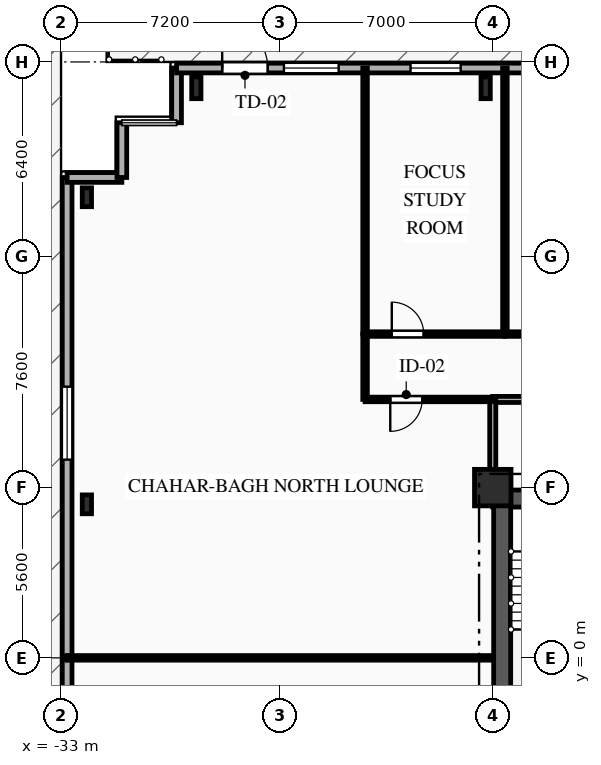
"""IFC4 building model, lengths in metres.
Left out: names, types, materials, properties, quantities, classifications, styles, units other than length and angle.
Written with IfcOpenShell. Run it as: python <this file> out.ifc"""

import sys

from ifc_helpers import new_model, si_unit, direction, frame, frame_2d, origin, origin_2d, place, context, subcontext, project, spatial, rectangle, i_section, extrude, element, fill, save


model = new_model("IFC4")
c1 = context("Model", 3, precision=1e-05, world=origin(), true_north=direction((0.0, 1.0)))
c2 = subcontext(c1, "Body", "Model", "MODEL_VIEW")
j1 = project(units=[si_unit("LENGTHUNIT", "METRE"), si_unit("PLANEANGLEUNIT", "RADIAN")], contexts=[c1])
p1 = place(None, origin())
s1 = spatial("IfcSite", under=j1, at=p1, CompositionType="ELEMENT")
p2 = place(p1, origin())
s2 = spatial("IfcBuilding", under=s1, at=p2, CompositionType="ELEMENT")
p3 = place(p2, frame((0.0, 0.0, 27.0)))
s3 = spatial("IfcBuildingStorey", under=s2, at=p3, CompositionType="ELEMENT", Elevation=27.0)
p4 = place(p3, frame((-18.8, 5.6, 0.0), z_axis=(0.0, 0.0, 1.0), x_axis=(1.0, 0.0, 0.0)))
e1 = element("IfcColumn", 1, at=p4, inside=s3, PredefinedType="COLUMN", context=c2, shape_type="SweptSolid", body=[
    extrude(rectangle(XDim=1.2, YDim=1.2, at=origin_2d()), origin(), (0.0, 0.0, 1.0), 3.35),
])
for number, where, z_axis, x_axis in (
    (2, (-19.033, 18.75, 0.0), (0.0, 0.0, 1.0), (1.0, 0.0, 0.0)),
    (3, (-28.55, 18.75, 0.0), (0.0, 0.0, 1.0), (1.0, 0.0, 0.0)),
):
    element("IfcColumn", number, at=place(p3, frame(where, z_axis=z_axis, x_axis=x_axis)), inside=s3, PredefinedType="COLUMN", context=c2, shape_type="SweptSolid", body=[
        extrude(i_section(OverallWidth=0.304, OverallDepth=0.716, WebThickness=0.021, FlangeThickness=0.04, FilletRadius=0.027, at=origin_2d()), origin(), (0.0, 0.0, 1.0), 3.35),
    ])
for number, where, z_axis, x_axis in (
    (4, (-32.15, 15.15, 0.0), (0.0, 0.0, 1.0), (1.0, 0.0, 0.0)),
    (5, (-32.15, 5.05, 0.0), (0.0, 0.0, 1.0), (1.0, 0.0, 0.0)),
):
    element("IfcColumn", number, at=place(p3, frame(where, z_axis=z_axis, x_axis=x_axis)), inside=s3, PredefinedType="COLUMN", context=c2, shape_type="SweptSolid", body=[
        extrude(i_section(OverallWidth=0.305, OverallDepth=0.62, WebThickness=0.021, FlangeThickness=0.04, FilletRadius=0.027, at=origin_2d()), origin(), (0.0, 0.0, 1.0), 3.35),
    ])
p5 = place(p3, frame((-32.8, -15.8, 0.0), z_axis=(0.0, 0.0, 1.0), x_axis=(0.0, 1.0, 0.0)))
e6 = element("IfcWall", 6, at=p5, inside=s3, PredefinedType="SOLIDWALL", context=c2, shape_type="SweptSolid", body=[
    extrude(rectangle(XDim=31.6, YDim=0.32, at=frame_2d((15.8, 0.0))), origin(), (0.0, 0.0, 1.0), 3.035),
])
p6 = place(p5, frame((6.96, 0.0, 0.85)))
e7 = element("IfcOpeningElement", 7, at=p6, cuts=e6, PredefinedType="OPENING", context=c2, shape_type="SweptSolid", body=[
    extrude(rectangle(XDim=2.4, YDim=1.95, at=frame_2d((1.2, 0.975))), frame((0.0, 0.17, 0.0), z_axis=(0.0, -1.0, 0.0), x_axis=(1.0, 0.0, 0.0)), (0.0, 0.0, 1.0), 0.34),
])
p7 = place(p5, frame((22.32, 0.0, 0.85)))
e8 = element("IfcOpeningElement", 8, at=p7, cuts=e6, PredefinedType="OPENING", context=c2, shape_type="SweptSolid", body=[
    extrude(rectangle(XDim=2.4, YDim=1.95, at=frame_2d((1.2, 0.975))), frame((0.0, 0.17, 0.0), z_axis=(0.0, -1.0, 0.0), x_axis=(1.0, 0.0, 0.0)), (0.0, 0.0, 1.0), 0.34),
])
for number, where, z_axis, x_axis in (
    (9, (-32.8, 15.8, 0.0), (0.0, 0.0, 1.0), (1.0, 0.0, 0.0)),
    (10, (-31.0, 15.8, 0.0), (0.0, 0.0, 1.0), (0.0, 1.0, 0.0)),
):
    element("IfcWall", number, at=place(p3, frame(where, z_axis=z_axis, x_axis=x_axis)), inside=s3, PredefinedType="SOLIDWALL", context=c2, shape_type="SweptSolid", body=[
        extrude(rectangle(XDim=1.8, YDim=0.32, at=frame_2d((0.9, 0.0))), origin(), (0.0, 0.0, 1.0), 3.035),
    ])
p8 = place(p3, frame((-29.2, 17.6, 0.0), z_axis=(0.0, 0.0, 1.0), x_axis=(0.0, 1.0, 0.0)))
e11 = element("IfcWall", 11, at=p8, inside=s3, PredefinedType="SOLIDWALL", context=c2, shape_type="SweptSolid", body=[
    extrude(rectangle(XDim=1.8, YDim=0.32, at=frame_2d((0.9, 0.0))), origin(), (0.0, 0.0, 1.0), 3.035),
])
p9 = place(p3, frame((-29.2, 19.4, 0.0), z_axis=(0.0, 0.0, 1.0), x_axis=(1.0, 0.0, 0.0)))
e12 = element("IfcWall", 12, at=p9, inside=s3, PredefinedType="SOLIDWALL", context=c2, shape_type="SweptSolid", body=[
    extrude(rectangle(XDim=58.4, YDim=0.32, at=frame_2d((29.2, 0.0))), origin(), (0.0, 0.0, 1.0), 3.035),
])
p10 = place(p9, frame((1.5, 0.0, 0.0)))
e13 = element("IfcOpeningElement", 13, at=p10, cuts=e12, PredefinedType="OPENING", context=c2, shape_type="SweptSolid", body=[
    extrude(rectangle(XDim=1.5, YDim=2.2, at=frame_2d((0.75, 1.1))), frame((0.0, 0.17, 0.0), z_axis=(0.0, -1.0, 0.0), x_axis=(1.0, 0.0, 0.0)), (0.0, 0.0, 1.0), 0.34),
])
p11 = place(p9, frame((3.531, 0.0, 0.85)))
e14 = element("IfcOpeningElement", 14, at=p11, cuts=e12, PredefinedType="OPENING", context=c2, shape_type="SweptSolid", body=[
    extrude(rectangle(XDim=1.8, YDim=1.85, at=frame_2d((0.9, 0.925))), frame((0.0, 0.17, 0.0), z_axis=(0.0, -1.0, 0.0), x_axis=(1.0, 0.0, 0.0)), (0.0, 0.0, 1.0), 0.34),
])
p12 = place(p9, frame((7.695, 0.0, 0.85)))
e15 = element("IfcOpeningElement", 15, at=p12, cuts=e12, PredefinedType="OPENING", context=c2, shape_type="SweptSolid", body=[
    extrude(rectangle(XDim=1.65, YDim=1.85, at=frame_2d((0.825, 0.925))), frame((0.0, 0.17, 0.0), z_axis=(0.0, -1.0, 0.0), x_axis=(1.0, 0.0, 0.0)), (0.0, 0.0, 1.0), 0.34),
])
p13 = place(p9, frame((12.335, 0.0, 0.85)))
e16 = element("IfcOpeningElement", 16, at=p13, cuts=e12, PredefinedType="OPENING", context=c2, shape_type="SweptSolid", body=[
    extrude(rectangle(XDim=1.65, YDim=1.85, at=frame_2d((0.825, 0.925))), frame((0.0, 0.17, 0.0), z_axis=(0.0, -1.0, 0.0), x_axis=(1.0, 0.0, 0.0)), (0.0, 0.0, 1.0), 0.34),
])
p14 = place(p9, frame((20.315, 0.0, 0.85)))
e17 = element("IfcOpeningElement", 17, at=p14, cuts=e12, PredefinedType="OPENING", context=c2, shape_type="SweptSolid", body=[
    extrude(rectangle(XDim=2.4, YDim=1.95, at=frame_2d((1.2, 0.975))), frame((0.0, 0.17, 0.0), z_axis=(0.0, -1.0, 0.0), x_axis=(1.0, 0.0, 0.0)), (0.0, 0.0, 1.0), 0.34),
])
p15 = place(p9, frame((26.565, 0.0, 0.85)))
e18 = element("IfcOpeningElement", 18, at=p15, cuts=e12, PredefinedType="OPENING", context=c2, shape_type="SweptSolid", body=[
    extrude(rectangle(XDim=2.4, YDim=1.95, at=frame_2d((1.2, 0.975))), frame((0.0, 0.17, 0.0), z_axis=(0.0, -1.0, 0.0), x_axis=(1.0, 0.0, 0.0)), (0.0, 0.0, 1.0), 0.34),
])
p16 = place(p9, frame((36.356, 0.0, 0.85)))
e19 = element("IfcOpeningElement", 19, at=p16, cuts=e12, PredefinedType="OPENING", context=c2, shape_type="SweptSolid", body=[
    extrude(rectangle(XDim=2.2, YDim=1.85, at=frame_2d((1.1, 0.925))), frame((0.0, 0.17, 0.0), z_axis=(0.0, -1.0, 0.0), x_axis=(1.0, 0.0, 0.0)), (0.0, 0.0, 1.0), 0.34),
])
p17 = place(p9, frame((44.495, 0.0, 0.85)))
e20 = element("IfcOpeningElement", 20, at=p17, cuts=e12, PredefinedType="OPENING", context=c2, shape_type="SweptSolid", body=[
    extrude(rectangle(XDim=1.65, YDim=1.85, at=frame_2d((0.825, 0.925))), frame((0.0, 0.17, 0.0), z_axis=(0.0, -1.0, 0.0), x_axis=(1.0, 0.0, 0.0)), (0.0, 0.0, 1.0), 0.34),
])
p18 = place(p9, frame((49.095, 0.0, 0.85)))
e21 = element("IfcOpeningElement", 21, at=p18, cuts=e12, PredefinedType="OPENING", context=c2, shape_type="SweptSolid", body=[
    extrude(rectangle(XDim=1.65, YDim=1.85, at=frame_2d((0.825, 0.925))), frame((0.0, 0.17, 0.0), z_axis=(0.0, -1.0, 0.0), x_axis=(1.0, 0.0, 0.0)), (0.0, 0.0, 1.0), 0.34),
])
p19 = place(p3, frame((-18.8, 5.24, 0.0), z_axis=(0.0, 0.0, 1.0), x_axis=(1.0, 0.0, 0.0)))
e22 = element("IfcWall", 22, at=p19, inside=s3, PredefinedType="SHEAR", context=c2, shape_type="SweptSolid", body=[
    extrude(rectangle(XDim=9.6, YDim=0.56, at=frame_2d((4.8, 0.0))), origin(), (0.0, 0.0, 1.0), 3.035),
])
p20 = place(p19, frame((1.55, 0.0, 0.0)))
e23 = element("IfcOpeningElement", 23, at=p20, cuts=e22, PredefinedType="OPENING", context=c2, shape_type="SweptSolid", body=[
    extrude(rectangle(XDim=1.1, YDim=2.15, at=frame_2d((0.55, 1.075))), frame((0.0, 0.29, 0.0), z_axis=(0.0, -1.0, 0.0), x_axis=(1.0, 0.0, 0.0)), (0.0, 0.0, 1.0), 0.58),
])
p21 = place(p19, frame((4.775, 0.0, 0.0)))
e24 = element("IfcOpeningElement", 24, at=p21, cuts=e22, PredefinedType="OPENING", context=c2, shape_type="SweptSolid", body=[
    extrude(rectangle(XDim=1.05, YDim=2.1, at=frame_2d((0.525, 1.05))), frame((0.0, 0.29, 0.0), z_axis=(0.0, -1.0, 0.0), x_axis=(1.0, 0.0, 0.0)), (0.0, 0.0, 1.0), 0.58),
])
p22 = place(p3, frame((-18.49, -5.05, 0.0), z_axis=(0.0, 0.0, 1.0), x_axis=(0.0, 1.0, 0.0)))
e25 = element("IfcWall", 25, at=p22, inside=s3, PredefinedType="SHEAR", context=c2, shape_type="SweptSolid", body=[
    extrude(rectangle(XDim=10.1, YDim=0.56, at=frame_2d((5.05, 0.0))), origin(), (0.0, 0.0, 1.0), 3.035),
])
p23 = place(p3, frame((-12.0, 8.5, 0.0), z_axis=(0.0, 0.0, 1.0), x_axis=(-1.0, 0.0, 0.0)))
e26 = element("IfcWall", 26, at=p23, inside=s3, PredefinedType="PARTITIONING", context=c2, shape_type="SweptSolid", body=[
    extrude(rectangle(XDim=6.8, YDim=0.2, at=frame_2d((3.4, 0.0))), origin(), (0.0, 0.0, 1.0), 3.035),
])
p24 = place(p23, frame((1.715, 0.0, 0.0)))
e27 = element("IfcOpeningElement", 27, at=p24, cuts=e26, PredefinedType="OPENING", context=c2, shape_type="SweptSolid", body=[
    extrude(rectangle(XDim=1.1, YDim=2.15, at=frame_2d((0.55, 1.075))), frame((0.0, 0.11, 0.0), z_axis=(0.0, -1.0, 0.0), x_axis=(1.0, 0.0, 0.0)), (0.0, 0.0, 1.0), 0.22),
])
p25 = place(p3, frame((-18.8, 8.5, 0.0), z_axis=(0.0, 0.0, 1.0), x_axis=(0.0, -1.0, 0.0)))
e28 = element("IfcWall", 28, at=p25, inside=s3, PredefinedType="PARTITIONING", context=c2, shape_type="SweptSolid", body=[
    extrude(rectangle(XDim=2.9, YDim=0.2, at=frame_2d((1.45, 0.0))), origin(), (0.0, 0.0, 1.0), 2.52),
])
p26 = place(p3, frame((-18.8, 8.5, 0.0), z_axis=(0.0, 0.0, 1.0), x_axis=(-1.0, 0.0, 0.0)))
e29 = element("IfcWall", 29, at=p26, inside=s3, PredefinedType="PARTITIONING", context=c2, shape_type="SweptSolid", body=[
    extrude(rectangle(XDim=4.2, YDim=0.15, at=frame_2d((2.1, 0.0))), origin(), (0.0, 0.0, 1.0), 3.035),
])
p27 = place(p26, frame((2.321, 0.0, 0.0)))
e30 = element("IfcOpeningElement", 30, at=p27, cuts=e29, PredefinedType="OPENING", context=c2, shape_type="SweptSolid", body=[
    extrude(rectangle(XDim=1.05, YDim=2.15, at=frame_2d((0.525, 1.075))), frame((0.0, 0.085, 0.0), z_axis=(0.0, -1.0, 0.0), x_axis=(1.0, 0.0, 0.0)), (0.0, 0.0, 1.0), 0.17),
])
p28 = place(p3, frame((-23.0, 8.5, 0.0), z_axis=(0.0, 0.0, 1.0), x_axis=(0.0, 1.0, 0.0)))
e31 = element("IfcWall", 31, at=p28, inside=s3, PredefinedType="PARTITIONING", context=c2, shape_type="SweptSolid", body=[
    extrude(rectangle(XDim=2.15, YDim=0.15, at=frame_2d((1.075, 0.0))), origin(), (0.0, 0.0, 1.0), 3.035),
])
p29 = place(p3, frame((-23.0, 10.65, 0.0), z_axis=(0.0, 0.0, 1.0), x_axis=(1.0, 0.0, 0.0)))
e32 = element("IfcWall", 32, at=p29, inside=s3, PredefinedType="PARTITIONING", context=c2, shape_type="SweptSolid", body=[
    extrude(rectangle(XDim=4.6, YDim=0.15, at=frame_2d((2.3, 0.0))), origin(), (0.0, 0.0, 1.0), 3.035),
])
p30 = place(p29, frame((0.879, 0.0, 0.0)))
e33 = element("IfcOpeningElement", 33, at=p30, cuts=e32, PredefinedType="OPENING", context=c2, shape_type="SweptSolid", body=[
    extrude(rectangle(XDim=1.05, YDim=2.15, at=frame_2d((0.525, 1.075))), frame((0.0, 0.085, 0.0), z_axis=(0.0, -1.0, 0.0), x_axis=(1.0, 0.0, 0.0)), (0.0, 0.0, 1.0), 0.17),
])
p31 = place(p3, frame((-18.4, 10.65, 0.0), z_axis=(0.0, 0.0, 1.0), x_axis=(1.0, 0.0, 0.0)))
e34 = element("IfcWall", 34, at=p31, inside=s3, PredefinedType="PARTITIONING", context=c2, shape_type="SweptSolid", body=[
    extrude(rectangle(XDim=4.6, YDim=0.15, at=frame_2d((2.3, 0.0))), origin(), (0.0, 0.0, 1.0), 3.035),
])
p32 = place(p31, frame((2.671, 0.0, 0.0)))
e35 = element("IfcOpeningElement", 35, at=p32, cuts=e34, PredefinedType="OPENING", context=c2, shape_type="SweptSolid", body=[
    extrude(rectangle(XDim=1.05, YDim=2.15, at=frame_2d((0.525, 1.075))), frame((0.0, 0.085, 0.0), z_axis=(0.0, -1.0, 0.0), x_axis=(1.0, 0.0, 0.0)), (0.0, 0.0, 1.0), 0.17),
])
p33 = place(p3, frame((-32.8, 0.0, 0.0), z_axis=(0.0, 0.0, 1.0), x_axis=(1.0, 0.0, 0.0)))
e36 = element("IfcWall", 36, at=p33, inside=s3, PredefinedType="PARTITIONING", context=c2, shape_type="SweptSolid", body=[
    extrude(rectangle(XDim=14.0, YDim=0.15, at=frame_2d((7.0, 0.0))), origin(), (0.0, 0.0, 1.0), 3.035),
])
for number, where, z_axis, x_axis in (
    (37, (-23.0, 19.4, 0.0), (0.0, 0.0, 1.0), (0.0, -1.0, 0.0)),
    (38, (-18.4, 19.4, 0.0), (0.0, 0.0, 1.0), (0.0, -1.0, 0.0)),
):
    element("IfcWall", number, at=place(p3, frame(where, z_axis=z_axis, x_axis=x_axis)), inside=s3, PredefinedType="PARTITIONING", context=c2, shape_type="SweptSolid", body=[
        extrude(rectangle(XDim=8.75, YDim=0.15, at=frame_2d((4.375, 0.0))), origin(), (0.0, 0.0, 1.0), 3.035),
    ])
p34 = place(p7, origin())
e39 = element("IfcWindow", 39, at=p34, inside=s3, PartitioningType="SINGLE_PANEL", PredefinedType="WINDOW", context=c2, shape_type="SweptSolid", body=[
    extrude(rectangle(XDim=2.4, YDim=1.95, at=frame_2d((1.2, 0.975))), frame((0.0, 0.03, 0.0), z_axis=(0.0, -1.0, 0.0), x_axis=(1.0, 0.0, 0.0)), (0.0, 0.0, 1.0), 0.06),
])
fill(e8, e39)
p35 = place(p10, origin())
e40 = element("IfcDoor", 40, at=p35, inside=s3, OperationType="SINGLE_SWING_LEFT", PredefinedType="DOOR", context=c2, shape_type="SweptSolid", body=[
    extrude(rectangle(XDim=1.5, YDim=2.2, at=frame_2d((0.75, 1.1))), frame((0.0, 0.025, 0.0), z_axis=(0.0, -1.0, 0.0), x_axis=(1.0, 0.0, 0.0)), (0.0, 0.0, 1.0), 0.05),
])
fill(e13, e40)
p36 = place(p11, origin())
e41 = element("IfcWindow", 41, at=p36, inside=s3, PartitioningType="SINGLE_PANEL", PredefinedType="WINDOW", context=c2, shape_type="SweptSolid", body=[
    extrude(rectangle(XDim=1.8, YDim=1.85, at=frame_2d((0.9, 0.925))), frame((0.0, 0.03, 0.0), z_axis=(0.0, -1.0, 0.0), x_axis=(1.0, 0.0, 0.0)), (0.0, 0.0, 1.0), 0.06),
])
fill(e14, e41)
p37 = place(p12, origin())
e42 = element("IfcWindow", 42, at=p37, inside=s3, PartitioningType="SINGLE_PANEL", PredefinedType="WINDOW", context=c2, shape_type="SweptSolid", body=[
    extrude(rectangle(XDim=1.65, YDim=1.85, at=frame_2d((0.825, 0.925))), frame((0.0, 0.03, 0.0), z_axis=(0.0, -1.0, 0.0), x_axis=(1.0, 0.0, 0.0)), (0.0, 0.0, 1.0), 0.06),
])
fill(e15, e42)
p38 = place(p27, origin())
e43 = element("IfcDoor", 43, at=p38, inside=s3, OperationType="SINGLE_SWING_RIGHT", PredefinedType="DOOR", context=c2, shape_type="SweptSolid", body=[
    extrude(rectangle(XDim=1.05, YDim=2.15, at=frame_2d((0.525, 1.075))), frame((0.0, 0.025, 0.0), z_axis=(0.0, -1.0, 0.0), x_axis=(1.0, 0.0, 0.0)), (0.0, 0.0, 1.0), 0.05),
])
fill(e30, e43)
p39 = place(p30, origin())
e44 = element("IfcDoor", 44, at=p39, inside=s3, OperationType="SINGLE_SWING_LEFT", PredefinedType="DOOR", context=c2, shape_type="SweptSolid", body=[
    extrude(rectangle(XDim=1.05, YDim=2.15, at=frame_2d((0.525, 1.075))), frame((0.0, 0.025, 0.0), z_axis=(0.0, -1.0, 0.0), x_axis=(1.0, 0.0, 0.0)), (0.0, 0.0, 1.0), 0.05),
])
fill(e33, e44)
save(model, sys.argv[1])
